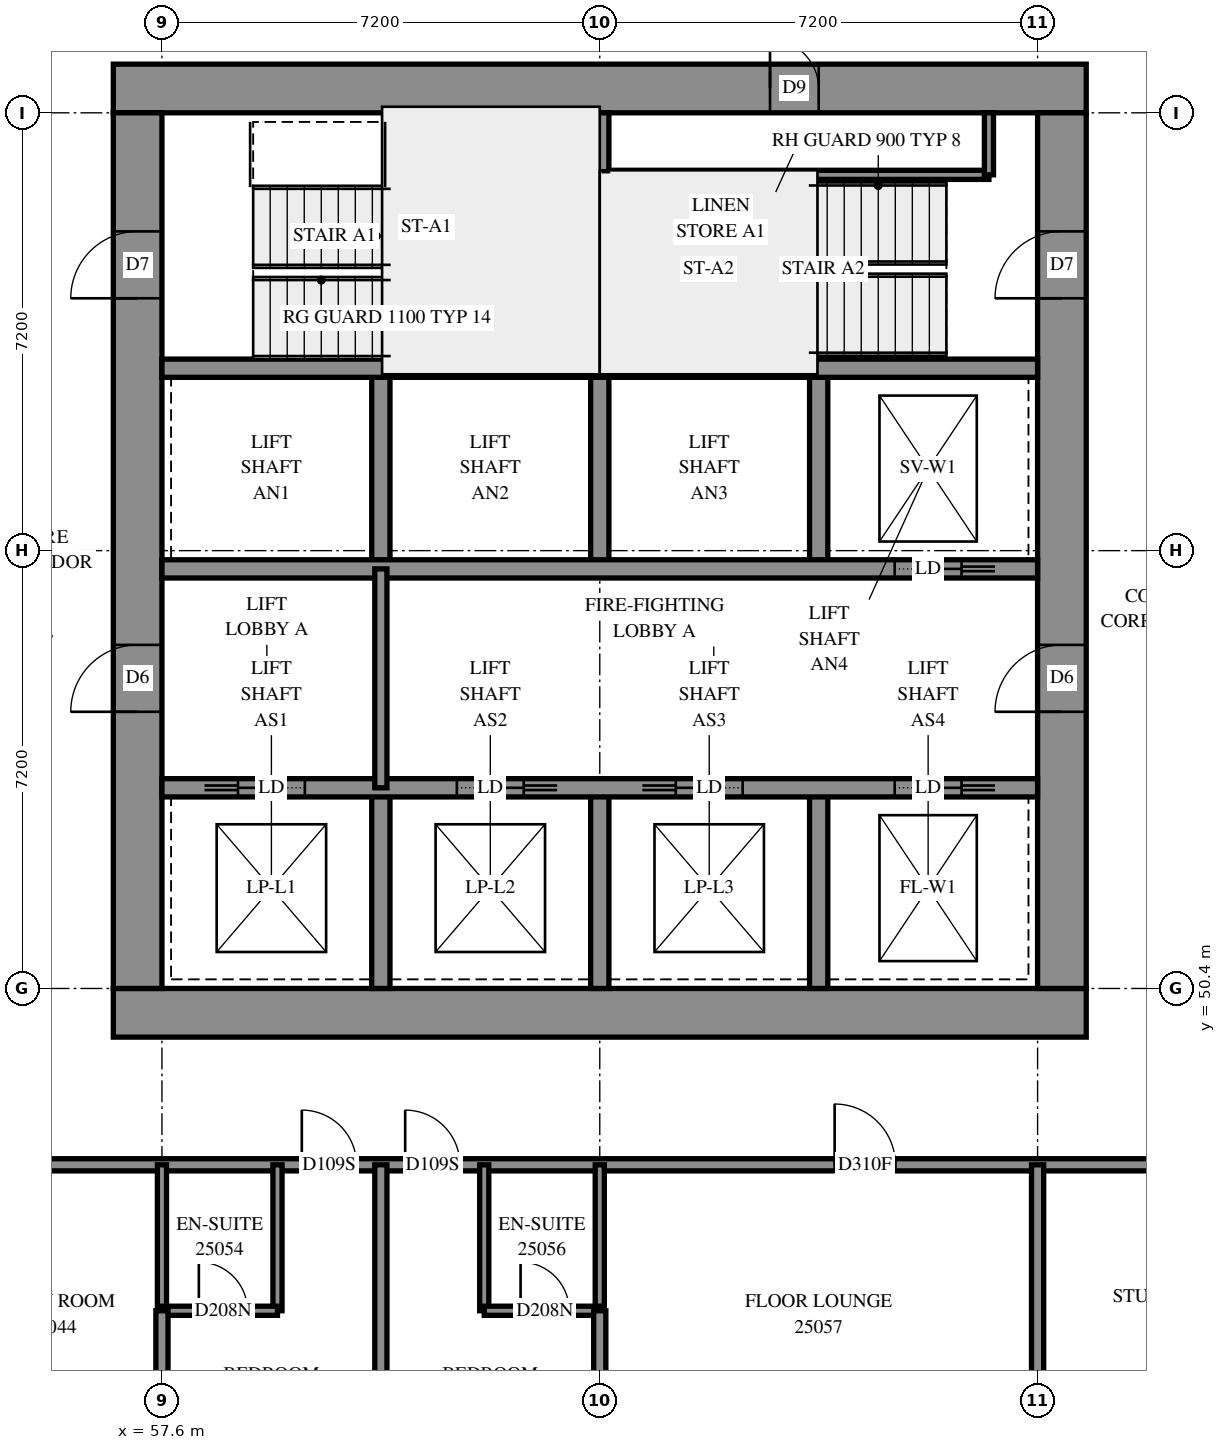
"""IFC4 building model, lengths in metres.
Left out: names, types, materials, properties, quantities, classifications, styles, units other than length and angle.
Written with IfcOpenShell. Run it as: python <this file> out.ifc"""

import sys

from ifc_helpers import new_model, si_unit, direction, frame, frame_2d, origin, place, context, subcontext, project, spatial, rectangle, extrude, element, fill, save


model = new_model("IFC4")
c1 = context("Model", 3, precision=1e-05, world=origin(), true_north=direction((0.0, 1.0)))
c2 = subcontext(c1, "Body", "Model", "MODEL_VIEW")
j1 = project(units=[si_unit("LENGTHUNIT", "METRE"), si_unit("PLANEANGLEUNIT", "RADIAN")], contexts=[c1])
p1 = place(None, origin())
s1 = spatial("IfcSite", under=j1, at=p1, CompositionType="ELEMENT")
p2 = place(p1, origin())
s2 = spatial("IfcBuilding", under=s1, at=p2, CompositionType="ELEMENT")
p3 = place(p2, frame((0.0, 0.0, 94.8)))
s3 = spatial("IfcBuildingStorey", under=s2, at=p3, CompositionType="ELEMENT", Elevation=94.8)
p4 = place(p3, frame((56.8, 50.0, -0.3), z_axis=(0.0, 0.0, 1.0), x_axis=(1.0, 0.0, 0.0)))
e1 = element("IfcWall", 1, at=p4, inside=s3, PredefinedType="SHEAR", context=c2, shape_type="SweptSolid", body=[
    extrude(rectangle(XDim=16.0, YDim=0.8, at=frame_2d((8.0, 0.0))), origin(), (0.0, 0.0, 1.0), 2.7),
])
p5 = place(p3, frame((56.8, 65.2, -0.3), z_axis=(0.0, 0.0, 1.0), x_axis=(1.0, 0.0, 0.0)))
e2 = element("IfcWall", 2, at=p5, inside=s3, PredefinedType="SHEAR", context=c2, shape_type="SweptSolid", body=[
    extrude(rectangle(XDim=16.0, YDim=0.8, at=frame_2d((8.0, 0.0))), origin(), (0.0, 0.0, 1.0), 2.7),
])
p6 = place(p5, frame((10.8, 0.0, 0.3)))
e3 = element("IfcOpeningElement", 3, at=p6, cuts=e2, PredefinedType="OPENING", context=c2, shape_type="SweptSolid", body=[
    extrude(rectangle(XDim=0.8, YDim=2.1, at=frame_2d((0.4, 1.05))), frame((0.0, 0.41, 0.0), z_axis=(0.0, -1.0, 0.0), x_axis=(1.0, 0.0, 0.0)), (0.0, 0.0, 1.0), 0.82),
])
p7 = place(p3, frame((57.2, 50.4, -0.3), z_axis=(0.0, 0.0, 1.0), x_axis=(0.0, 1.0, 0.0)))
e4 = element("IfcWall", 4, at=p7, inside=s3, PredefinedType="SHEAR", context=c2, shape_type="SweptSolid", body=[
    extrude(rectangle(XDim=14.4, YDim=0.8, at=frame_2d((7.2, 0.0))), origin(), (0.0, 0.0, 1.0), 2.7),
])
p8 = place(p7, frame((4.55, 0.0, 0.3)))
e5 = element("IfcOpeningElement", 5, at=p8, cuts=e4, PredefinedType="OPENING", context=c2, shape_type="SweptSolid", body=[
    extrude(rectangle(XDim=1.1, YDim=2.1, at=frame_2d((0.55, 1.05))), frame((0.0, 0.41, 0.0), z_axis=(0.0, -1.0, 0.0), x_axis=(1.0, 0.0, 0.0)), (0.0, 0.0, 1.0), 0.82),
])
p9 = place(p7, frame((11.35, 0.0, 0.3)))
e6 = element("IfcOpeningElement", 6, at=p9, cuts=e4, PredefinedType="OPENING", context=c2, shape_type="SweptSolid", body=[
    extrude(rectangle(XDim=1.1, YDim=2.1, at=frame_2d((0.55, 1.05))), frame((0.0, 0.41, 0.0), z_axis=(0.0, -1.0, 0.0), x_axis=(1.0, 0.0, 0.0)), (0.0, 0.0, 1.0), 0.82),
])
p10 = place(p3, frame((72.4, 50.4, -0.3), z_axis=(0.0, 0.0, 1.0), x_axis=(0.0, 1.0, 0.0)))
e7 = element("IfcWall", 7, at=p10, inside=s3, PredefinedType="SHEAR", context=c2, shape_type="SweptSolid", body=[
    extrude(rectangle(XDim=14.4, YDim=0.8, at=frame_2d((7.2, 0.0))), origin(), (0.0, 0.0, 1.0), 2.7),
])
p11 = place(p10, frame((4.55, 0.0, 0.3)))
e8 = element("IfcOpeningElement", 8, at=p11, cuts=e7, PredefinedType="OPENING", context=c2, shape_type="SweptSolid", body=[
    extrude(rectangle(XDim=1.1, YDim=2.1, at=frame_2d((0.55, 1.05))), frame((0.0, 0.41, 0.0), z_axis=(0.0, -1.0, 0.0), x_axis=(1.0, 0.0, 0.0)), (0.0, 0.0, 1.0), 0.82),
])
p12 = place(p10, frame((11.35, 0.0, 0.3)))
e9 = element("IfcOpeningElement", 9, at=p12, cuts=e7, PredefinedType="OPENING", context=c2, shape_type="SweptSolid", body=[
    extrude(rectangle(XDim=1.1, YDim=2.1, at=frame_2d((0.55, 1.05))), frame((0.0, 0.41, 0.0), z_axis=(0.0, -1.0, 0.0), x_axis=(1.0, 0.0, 0.0)), (0.0, 0.0, 1.0), 0.82),
])
for number, where, z_axis, x_axis in (
    (10, (61.2, 50.4, 0.0), (0.0, 0.0, 1.0), (0.0, 1.0, 0.0)),
    (11, (61.2, 57.3, 0.0), (0.0, 0.0, 1.0), (0.0, 1.0, 0.0)),
    (12, (64.8, 50.4, 0.0), (0.0, 0.0, 1.0), (0.0, 1.0, 0.0)),
    (13, (64.8, 57.3, 0.0), (0.0, 0.0, 1.0), (0.0, 1.0, 0.0)),
    (14, (68.4, 50.4, 0.0), (0.0, 0.0, 1.0), (0.0, 1.0, 0.0)),
    (15, (68.4, 57.3, 0.0), (0.0, 0.0, 1.0), (0.0, 1.0, 0.0)),
):
    element("IfcWall", number, at=place(p3, frame(where, z_axis=z_axis, x_axis=x_axis)), inside=s3, PredefinedType="SOLIDWALL", context=c2, shape_type="SweptSolid", body=[
        extrude(rectangle(XDim=3.3, YDim=0.3, at=frame_2d((1.65, 0.0))), origin(), (0.0, 0.0, 1.0), 3.1),
    ])
p13 = place(p3, frame((57.6, 53.7, 0.0), z_axis=(0.0, 0.0, 1.0), x_axis=(1.0, 0.0, 0.0)))
e16 = element("IfcWall", 16, at=p13, inside=s3, PredefinedType="SOLIDWALL", context=c2, shape_type="SweptSolid", body=[
    extrude(rectangle(XDim=14.4, YDim=0.3, at=frame_2d((7.2, 0.0))), origin(), (0.0, 0.0, 1.0), 3.1),
])
p14 = place(p13, frame((1.25, 0.0, 0.0)))
e17 = element("IfcOpeningElement", 17, at=p14, cuts=e16, PredefinedType="OPENING", context=c2, shape_type="SweptSolid", body=[
    extrude(rectangle(XDim=1.1, YDim=2.1, at=frame_2d((0.55, 1.05))), frame((0.0, 0.16, 0.0), z_axis=(0.0, -1.0, 0.0), x_axis=(1.0, 0.0, 0.0)), (0.0, 0.0, 1.0), 0.32),
])
p15 = place(p13, frame((4.85, 0.0, 0.0)))
e18 = element("IfcOpeningElement", 18, at=p15, cuts=e16, PredefinedType="OPENING", context=c2, shape_type="SweptSolid", body=[
    extrude(rectangle(XDim=1.1, YDim=2.1, at=frame_2d((0.55, 1.05))), frame((0.0, 0.16, 0.0), z_axis=(0.0, -1.0, 0.0), x_axis=(1.0, 0.0, 0.0)), (0.0, 0.0, 1.0), 0.32),
])
p16 = place(p13, frame((8.45, 0.0, 0.0)))
e19 = element("IfcOpeningElement", 19, at=p16, cuts=e16, PredefinedType="OPENING", context=c2, shape_type="SweptSolid", body=[
    extrude(rectangle(XDim=1.1, YDim=2.1, at=frame_2d((0.55, 1.05))), frame((0.0, 0.16, 0.0), z_axis=(0.0, -1.0, 0.0), x_axis=(1.0, 0.0, 0.0)), (0.0, 0.0, 1.0), 0.32),
])
p17 = place(p13, frame((12.05, 0.0, 0.0)))
e20 = element("IfcOpeningElement", 20, at=p17, cuts=e16, PredefinedType="OPENING", context=c2, shape_type="SweptSolid", body=[
    extrude(rectangle(XDim=1.1, YDim=2.1, at=frame_2d((0.55, 1.05))), frame((0.0, 0.16, 0.0), z_axis=(0.0, -1.0, 0.0), x_axis=(1.0, 0.0, 0.0)), (0.0, 0.0, 1.0), 0.32),
])
p18 = place(p3, frame((57.6, 57.3, 0.0), z_axis=(0.0, 0.0, 1.0), x_axis=(1.0, 0.0, 0.0)))
e21 = element("IfcWall", 21, at=p18, inside=s3, PredefinedType="SOLIDWALL", context=c2, shape_type="SweptSolid", body=[
    extrude(rectangle(XDim=14.4, YDim=0.3, at=frame_2d((7.2, 0.0))), origin(), (0.0, 0.0, 1.0), 3.1),
])
p19 = place(p18, frame((12.05, 0.0, 0.0)))
e22 = element("IfcOpeningElement", 22, at=p19, cuts=e21, PredefinedType="OPENING", context=c2, shape_type="SweptSolid", body=[
    extrude(rectangle(XDim=1.1, YDim=2.1, at=frame_2d((0.55, 1.05))), frame((0.0, 0.16, 0.0), z_axis=(0.0, -1.0, 0.0), x_axis=(1.0, 0.0, 0.0)), (0.0, 0.0, 1.0), 0.32),
])
for number, where, z_axis, x_axis in (
    (23, (57.6, 60.6, 0.0), (0.0, 0.0, 1.0), (1.0, 0.0, 0.0)),
    (24, (64.8, 60.6, 0.0), (0.0, 0.0, 1.0), (1.0, 0.0, 0.0)),
):
    element("IfcWall", number, at=place(p3, frame(where, z_axis=z_axis, x_axis=x_axis)), inside=s3, PredefinedType="SOLIDWALL", context=c2, shape_type="SweptSolid", body=[
        extrude(rectangle(XDim=7.2, YDim=0.3, at=frame_2d((3.6, 0.0))), origin(), (0.0, 0.0, 1.0), 3.1),
    ])
p20 = place(p3, frame((64.8, 60.6, 0.0), z_axis=(0.0, 0.0, 1.0), x_axis=(0.0, 1.0, 0.0)))
e25 = element("IfcWall", 25, at=p20, inside=s3, PredefinedType="SOLIDWALL", context=c2, shape_type="SweptSolid", body=[
    extrude(rectangle(XDim=4.2, YDim=0.3, at=frame_2d((2.1, 0.0))), origin(), (0.0, 0.0, 1.0), 3.1),
])
p21 = place(p3, frame((64.95, 63.78, 0.0), z_axis=(0.0, 0.0, 1.0), x_axis=(1.0, 0.0, 0.0)))
e26 = element("IfcWall", 26, at=p21, inside=s3, PredefinedType="PARTITIONING", context=c2, shape_type="SweptSolid", body=[
    extrude(rectangle(XDim=6.25, YDim=0.15, at=frame_2d((3.125, 0.0))), origin(), (0.0, 0.0, 1.0), 3.1),
])
p22 = place(p3, frame((71.2, 63.78, 0.0), z_axis=(0.0, 0.0, 1.0), x_axis=(0.0, 1.0, 0.0)))
e27 = element("IfcWall", 27, at=p22, inside=s3, PredefinedType="PARTITIONING", context=c2, shape_type="SweptSolid", body=[
    extrude(rectangle(XDim=1.02, YDim=0.15, at=frame_2d((0.51, 0.0))), origin(), (0.0, 0.0, 1.0), 3.1),
])
p23 = place(p3, frame((61.2, 53.7, 0.0), z_axis=(0.0, 0.0, 1.0), x_axis=(0.0, 1.0, 0.0)))
e28 = element("IfcWall", 28, at=p23, inside=s3, PredefinedType="PARTITIONING", context=c2, shape_type="SweptSolid", body=[
    extrude(rectangle(XDim=3.6, YDim=0.2, at=frame_2d((1.8, 0.0))), origin(), (0.0, 0.0, 1.0), 3.1),
])
p24 = place(p3, frame((54.7, 47.5, 0.0), z_axis=(0.0, 0.0, 1.0), x_axis=(1.0, 0.0, 0.0)))
e29 = element("IfcWall", 29, at=p24, inside=s3, PredefinedType="PARTITIONING", context=c2, shape_type="SweptSolid", body=[
    extrude(rectangle(XDim=19.442, YDim=0.2, at=frame_2d((9.721, 0.0))), origin(), (0.0, 0.0, 1.0), 3.1),
])
p25 = place(p24, frame((5.2, 0.0, 0.0)))
e30 = element("IfcOpeningElement", 30, at=p25, cuts=e29, PredefinedType="OPENING", context=c2, shape_type="SweptSolid", body=[
    extrude(rectangle(XDim=0.9, YDim=2.1, at=frame_2d((0.45, 1.05))), frame((0.0, 0.11, 0.0), z_axis=(0.0, -1.0, 0.0), x_axis=(1.0, 0.0, 0.0)), (0.0, 0.0, 1.0), 0.22),
])
p26 = place(p24, frame((6.9, 0.0, 0.0)))
e31 = element("IfcOpeningElement", 31, at=p26, cuts=e29, PredefinedType="OPENING", context=c2, shape_type="SweptSolid", body=[
    extrude(rectangle(XDim=0.9, YDim=2.1, at=frame_2d((0.45, 1.05))), frame((0.0, 0.11, 0.0), z_axis=(0.0, -1.0, 0.0), x_axis=(1.0, 0.0, 0.0)), (0.0, 0.0, 1.0), 0.22),
])
p27 = place(p24, frame((13.963, 0.0, 0.0)))
e32 = element("IfcOpeningElement", 32, at=p27, cuts=e29, PredefinedType="OPENING", context=c2, shape_type="SweptSolid", body=[
    extrude(rectangle(XDim=1.0, YDim=2.1, at=frame_2d((0.5, 1.05))), frame((0.0, 0.11, 0.0), z_axis=(0.0, -1.0, 0.0), x_axis=(1.0, 0.0, 0.0)), (0.0, 0.0, 1.0), 0.22),
])
p28 = place(p3, frame((61.2, 42.339, 0.0), z_axis=(0.0, 0.0, 1.0), x_axis=(0.0, 1.0, 0.0)))
e33 = element("IfcWall", 33, at=p28, inside=s3, PredefinedType="PARTITIONING", context=c2, shape_type="SweptSolid", body=[
    extrude(rectangle(XDim=5.162, YDim=0.2, at=frame_2d((2.581, 0.0))), origin(), (0.0, 0.0, 1.0), 3.1),
])
p29 = place(p3, frame((72.0, 43.7, 0.0), z_axis=(0.0, 0.0, 1.0), x_axis=(0.0, 1.0, 0.0)))
e34 = element("IfcWall", 34, at=p29, inside=s3, PredefinedType="PARTITIONING", context=c2, shape_type="SweptSolid", body=[
    extrude(rectangle(XDim=3.8, YDim=0.2, at=frame_2d((1.9, 0.0))), origin(), (0.0, 0.0, 1.0), 3.1),
])
for number, where, z_axis, x_axis in (
    (35, (59.5, 45.1, 0.0), (0.0, 0.0, 1.0), (0.0, 1.0, 0.0)),
    (36, (57.6, 45.1, 0.0), (0.0, 0.0, 1.0), (0.0, 1.0, 0.0)),
    (37, (62.9, 45.1, 0.0), (0.0, 0.0, 1.0), (0.0, 1.0, 0.0)),
    (38, (64.8, 45.1, 0.0), (0.0, 0.0, 1.0), (0.0, 1.0, 0.0)),
):
    element("IfcWall", number, at=place(p3, frame(where, z_axis=z_axis, x_axis=x_axis)), inside=s3, PredefinedType="PARTITIONING", context=c2, shape_type="SweptSolid", body=[
        extrude(rectangle(XDim=2.4, YDim=0.15, at=frame_2d((1.2, 0.0))), origin(), (0.0, 0.0, 1.0), 3.1),
    ])
p30 = place(p3, frame((57.6, 45.1, 0.0), z_axis=(0.0, 0.0, 1.0), x_axis=(1.0, 0.0, 0.0)))
e39 = element("IfcWall", 39, at=p30, inside=s3, PredefinedType="PARTITIONING", context=c2, shape_type="SweptSolid", body=[
    extrude(rectangle(XDim=1.9, YDim=0.15, at=frame_2d((0.95, 0.0))), origin(), (0.0, 0.0, 1.0), 3.1),
])
p31 = place(p30, frame((0.607, 0.0, 0.0)))
e40 = element("IfcOpeningElement", 40, at=p31, cuts=e39, PredefinedType="OPENING", context=c2, shape_type="SweptSolid", body=[
    extrude(rectangle(XDim=0.8, YDim=2.1, at=frame_2d((0.4, 1.05))), frame((0.0, 0.085, 0.0), z_axis=(0.0, -1.0, 0.0), x_axis=(1.0, 0.0, 0.0)), (0.0, 0.0, 1.0), 0.17),
])
p32 = place(p3, frame((62.9, 45.1, 0.0), z_axis=(0.0, 0.0, 1.0), x_axis=(1.0, 0.0, 0.0)))
e41 = element("IfcWall", 41, at=p32, inside=s3, PredefinedType="PARTITIONING", context=c2, shape_type="SweptSolid", body=[
    extrude(rectangle(XDim=1.9, YDim=0.15, at=frame_2d((0.95, 0.0))), origin(), (0.0, 0.0, 1.0), 3.1),
])
p33 = place(p32, frame((0.598, 0.0, 0.0)))
e42 = element("IfcOpeningElement", 42, at=p33, cuts=e41, PredefinedType="OPENING", context=c2, shape_type="SweptSolid", body=[
    extrude(rectangle(XDim=0.8, YDim=2.1, at=frame_2d((0.4, 1.05))), frame((0.0, 0.085, 0.0), z_axis=(0.0, -1.0, 0.0), x_axis=(1.0, 0.0, 0.0)), (0.0, 0.0, 1.0), 0.17),
])
for number, where, z_axis, x_axis in (
    (43, (57.6, 43.7, 0.0), (0.0, 0.0, 1.0), (0.0, 1.0, 0.0)),
    (44, (64.8, 43.7, 0.0), (0.0, 0.0, 1.0), (0.0, 1.0, 0.0)),
):
    element("IfcWall", number, at=place(p3, frame(where, z_axis=z_axis, x_axis=x_axis)), inside=s3, PredefinedType="PARTITIONING", context=c2, shape_type="SweptSolid", body=[
        extrude(rectangle(XDim=1.4, YDim=0.2, at=frame_2d((0.7, 0.0))), origin(), (0.0, 0.0, 1.0), 3.1),
    ])
p34 = place(p6, origin())
e45 = element("IfcDoor", 45, at=p34, inside=s3, OperationType="SINGLE_SWING_RIGHT", PredefinedType="DOOR", context=c2, shape_type="SweptSolid", body=[
    extrude(rectangle(XDim=0.8, YDim=2.1, at=frame_2d((0.4, 1.05))), frame((0.0, -0.34, 0.0), z_axis=(0.0, -1.0, 0.0), x_axis=(1.0, 0.0, 0.0)), (0.0, 0.0, 1.0), 0.05),
])
fill(e3, e45)
p35 = place(p8, origin())
e46 = element("IfcDoor", 46, at=p35, inside=s3, OperationType="DOUBLE_DOOR_SINGLE_SWING", PredefinedType="DOOR", context=c2, shape_type="SweptSolid", body=[
    extrude(rectangle(XDim=1.1, YDim=2.1, at=frame_2d((0.55, 1.05))), frame((0.0, 0.025, 0.0), z_axis=(0.0, -1.0, 0.0), x_axis=(1.0, 0.0, 0.0)), (0.0, 0.0, 1.0), 0.05),
])
fill(e5, e46)
p36 = place(p11, origin())
e47 = element("IfcDoor", 47, at=p36, inside=s3, OperationType="DOUBLE_DOOR_SINGLE_SWING", PredefinedType="DOOR", context=c2, shape_type="SweptSolid", body=[
    extrude(rectangle(XDim=1.1, YDim=2.1, at=frame_2d((0.55, 1.05))), frame((0.0, 0.025, 0.0), z_axis=(0.0, -1.0, 0.0), x_axis=(1.0, 0.0, 0.0)), (0.0, 0.0, 1.0), 0.05),
])
fill(e8, e47)
p37 = place(p9, origin())
e48 = element("IfcDoor", 48, at=p37, inside=s3, OperationType="SINGLE_SWING_LEFT", PredefinedType="DOOR", context=c2, shape_type="SweptSolid", body=[
    extrude(rectangle(XDim=1.1, YDim=2.1, at=frame_2d((0.55, 1.05))), frame((0.0, 0.025, 0.0), z_axis=(0.0, -1.0, 0.0), x_axis=(1.0, 0.0, 0.0)), (0.0, 0.0, 1.0), 0.05),
])
fill(e6, e48)
p38 = place(p12, origin())
e49 = element("IfcDoor", 49, at=p38, inside=s3, OperationType="SINGLE_SWING_RIGHT", PredefinedType="DOOR", context=c2, shape_type="SweptSolid", body=[
    extrude(rectangle(XDim=1.1, YDim=2.1, at=frame_2d((0.55, 1.05))), frame((0.0, 0.025, 0.0), z_axis=(0.0, -1.0, 0.0), x_axis=(1.0, 0.0, 0.0)), (0.0, 0.0, 1.0), 0.05),
])
fill(e9, e49)
p39 = place(p14, origin())
e50 = element("IfcDoor", 50, at=p39, inside=s3, OperationType="SLIDING_TO_LEFT", PredefinedType="DOOR", context=c2, shape_type="SweptSolid", body=[
    extrude(rectangle(XDim=1.1, YDim=2.1, at=frame_2d((0.55, 1.05))), frame((0.0, 0.025, 0.0), z_axis=(0.0, -1.0, 0.0), x_axis=(1.0, 0.0, 0.0)), (0.0, 0.0, 1.0), 0.05),
])
fill(e17, e50)
p40 = place(p15, origin())
e51 = element("IfcDoor", 51, at=p40, inside=s3, OperationType="SLIDING_TO_RIGHT", PredefinedType="DOOR", context=c2, shape_type="SweptSolid", body=[
    extrude(rectangle(XDim=1.1, YDim=2.1, at=frame_2d((0.55, 1.05))), frame((0.0, 0.025, 0.0), z_axis=(0.0, -1.0, 0.0), x_axis=(1.0, 0.0, 0.0)), (0.0, 0.0, 1.0), 0.05),
])
fill(e18, e51)
p41 = place(p16, origin())
e52 = element("IfcDoor", 52, at=p41, inside=s3, OperationType="SLIDING_TO_LEFT", PredefinedType="DOOR", context=c2, shape_type="SweptSolid", body=[
    extrude(rectangle(XDim=1.1, YDim=2.1, at=frame_2d((0.55, 1.05))), frame((0.0, 0.025, 0.0), z_axis=(0.0, -1.0, 0.0), x_axis=(1.0, 0.0, 0.0)), (0.0, 0.0, 1.0), 0.05),
])
fill(e19, e52)
p42 = place(p17, origin())
e53 = element("IfcDoor", 53, at=p42, inside=s3, OperationType="SLIDING_TO_RIGHT", PredefinedType="DOOR", context=c2, shape_type="SweptSolid", body=[
    extrude(rectangle(XDim=1.1, YDim=2.1, at=frame_2d((0.55, 1.05))), frame((0.0, 0.025, 0.0), z_axis=(0.0, -1.0, 0.0), x_axis=(1.0, 0.0, 0.0)), (0.0, 0.0, 1.0), 0.05),
])
fill(e20, e53)
p43 = place(p19, origin())
e54 = element("IfcDoor", 54, at=p43, inside=s3, OperationType="SLIDING_TO_RIGHT", PredefinedType="DOOR", context=c2, shape_type="SweptSolid", body=[
    extrude(rectangle(XDim=1.1, YDim=2.1, at=frame_2d((0.55, 1.05))), frame((0.0, 0.025, 0.0), z_axis=(0.0, -1.0, 0.0), x_axis=(1.0, 0.0, 0.0)), (0.0, 0.0, 1.0), 0.05),
])
fill(e22, e54)
p44 = place(p25, origin())
e55 = element("IfcDoor", 55, at=p44, inside=s3, OperationType="SINGLE_SWING_LEFT", PredefinedType="DOOR", context=c2, shape_type="SweptSolid", body=[
    extrude(rectangle(XDim=0.9, YDim=2.1, at=frame_2d((0.45, 1.05))), frame((0.0, 0.025, 0.0), z_axis=(0.0, -1.0, 0.0), x_axis=(1.0, 0.0, 0.0)), (0.0, 0.0, 1.0), 0.05),
])
fill(e30, e55)
p45 = place(p31, origin())
e56 = element("IfcDoor", 56, at=p45, inside=s3, OperationType="SINGLE_SWING_RIGHT", PredefinedType="DOOR", context=c2, shape_type="SweptSolid", body=[
    extrude(rectangle(XDim=0.8, YDim=2.1, at=frame_2d((0.4, 1.05))), frame((0.0, 0.025, 0.0), z_axis=(0.0, -1.0, 0.0), x_axis=(1.0, 0.0, 0.0)), (0.0, 0.0, 1.0), 0.05),
])
fill(e40, e56)
p46 = place(p26, origin())
e57 = element("IfcDoor", 57, at=p46, inside=s3, OperationType="SINGLE_SWING_RIGHT", PredefinedType="DOOR", context=c2, shape_type="SweptSolid", body=[
    extrude(rectangle(XDim=0.9, YDim=2.1, at=frame_2d((0.45, 1.05))), frame((0.0, 0.025, 0.0), z_axis=(0.0, -1.0, 0.0), x_axis=(1.0, 0.0, 0.0)), (0.0, 0.0, 1.0), 0.05),
])
fill(e31, e57)
p47 = place(p33, origin())
e58 = element("IfcDoor", 58, at=p47, inside=s3, OperationType="SINGLE_SWING_RIGHT", PredefinedType="DOOR", context=c2, shape_type="SweptSolid", body=[
    extrude(rectangle(XDim=0.8, YDim=2.1, at=frame_2d((0.4, 1.05))), frame((0.0, 0.025, 0.0), z_axis=(0.0, -1.0, 0.0), x_axis=(1.0, 0.0, 0.0)), (0.0, 0.0, 1.0), 0.05),
])
fill(e42, e58)
p48 = place(p27, origin())
e59 = element("IfcDoor", 59, at=p48, inside=s3, OperationType="SINGLE_SWING_LEFT", PredefinedType="DOOR", context=c2, shape_type="SweptSolid", body=[
    extrude(rectangle(XDim=1.0, YDim=2.1, at=frame_2d((0.5, 1.05))), frame((0.0, 0.025, 0.0), z_axis=(0.0, -1.0, 0.0), x_axis=(1.0, 0.0, 0.0)), (0.0, 0.0, 1.0), 0.05),
])
fill(e32, e59)
save(model, sys.argv[1])
